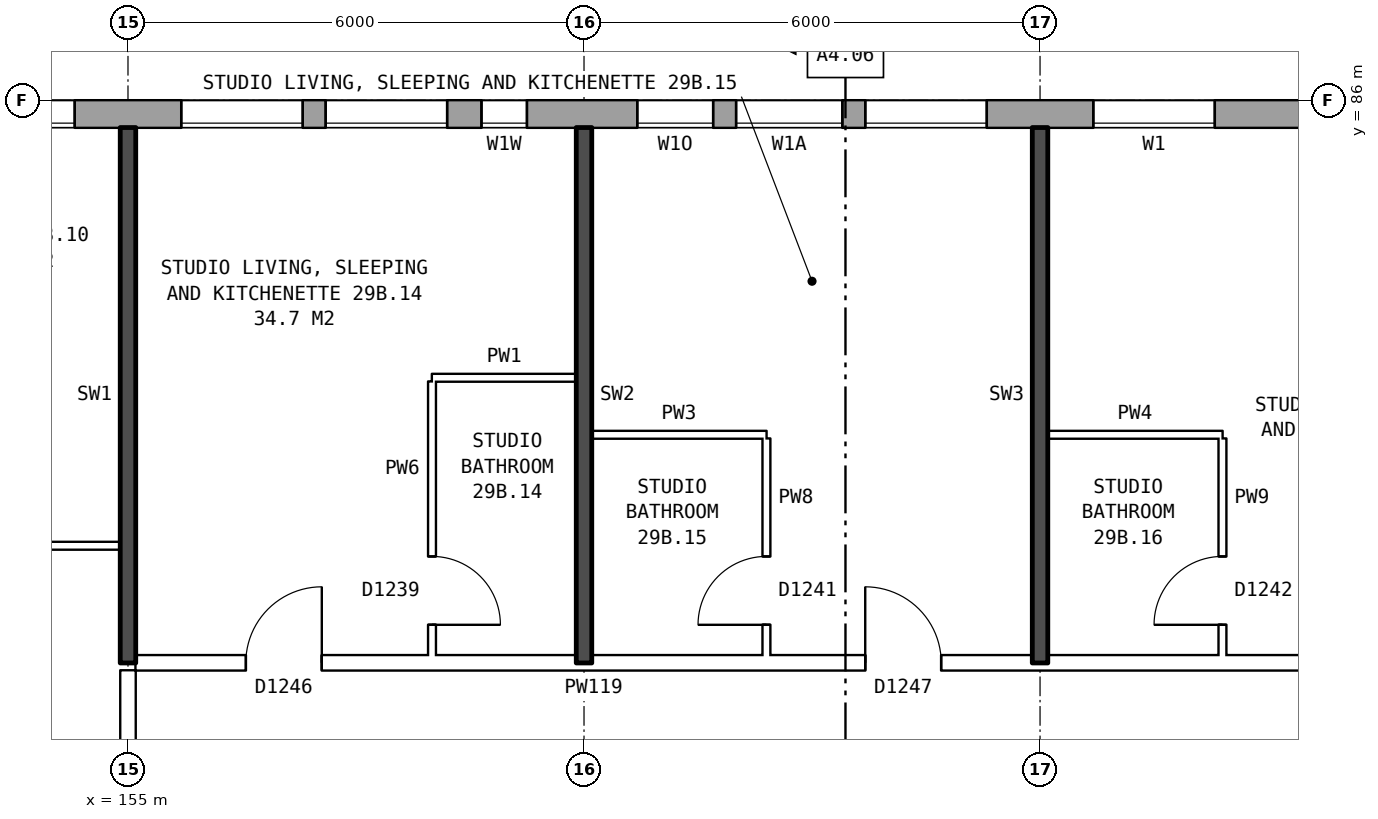
"""IFC4 building model, lengths in metres.
Left out: names, types, materials, properties, quantities, classifications, styles, units other than length and angle.
Written with IfcOpenShell. Run it as: python <this file> out.ifc"""

import sys

from ifc_helpers import new_model, si_unit, direction, frame, frame_2d, origin, place, context, subcontext, project, spatial, rectangle, extrude, element, fill, save


model = new_model("IFC4")
c1 = context("Model", 3, precision=1e-05, world=origin(), true_north=direction((0.0, 1.0)))
c2 = subcontext(c1, "Body", "Model", "MODEL_VIEW")
j1 = project(units=[si_unit("LENGTHUNIT", "METRE"), si_unit("PLANEANGLEUNIT", "RADIAN")], contexts=[c1])
p1 = place(None, origin())
s1 = spatial("IfcSite", under=j1, at=p1, CompositionType="ELEMENT")
p2 = place(p1, origin())
s2 = spatial("IfcBuilding", under=s1, at=p2, CompositionType="ELEMENT")
p3 = place(p2, frame((0.0, 0.0, 105.7)))
s3 = spatial("IfcBuildingStorey", under=s2, at=p3, CompositionType="ELEMENT", Elevation=105.7)
p4 = place(p3, frame((170.925, 85.82, 0.0), z_axis=(0.0, 0.0, 1.0), x_axis=(-1.0, 0.0, 0.0)))
e1 = element("IfcWall", 1, at=p4, inside=s3, PredefinedType="STANDARD", context=c2, shape_type="SweptSolid", body=[
    extrude(rectangle(XDim=36.851, YDim=0.36, at=frame_2d((18.425, 0.0))), origin(), (0.0, 0.0, 1.0), 2.85),
])
p5 = place(p4, frame((1.625, 0.0, 0.8)))
e2 = element("IfcOpeningElement", 2, at=p5, cuts=e1, PredefinedType="OPENING", context=c2, shape_type="SweptSolid", body=[
    extrude(rectangle(XDim=1.6, YDim=1.8, at=frame_2d((0.8, 0.9))), frame((0.0, 0.19, 0.0), z_axis=(0.0, -1.0, 0.0), x_axis=(1.0, 0.0, 0.0)), (0.0, 0.0, 1.0), 0.38),
])
p6 = place(p4, frame((4.625, 0.0, 0.8)))
e3 = element("IfcOpeningElement", 3, at=p6, cuts=e1, PredefinedType="OPENING", context=c2, shape_type="SweptSolid", body=[
    extrude(rectangle(XDim=1.6, YDim=1.8, at=frame_2d((0.8, 0.9))), frame((0.0, 0.19, 0.0), z_axis=(0.0, -1.0, 0.0), x_axis=(1.0, 0.0, 0.0)), (0.0, 0.0, 1.0), 0.38),
])
p7 = place(p4, frame((6.525, 0.0, 0.8)))
e4 = element("IfcOpeningElement", 4, at=p7, cuts=e1, PredefinedType="OPENING", context=c2, shape_type="SweptSolid", body=[
    extrude(rectangle(XDim=1.4, YDim=1.8, at=frame_2d((0.7, 0.9))), frame((0.0, 0.19, 0.0), z_axis=(0.0, -1.0, 0.0), x_axis=(1.0, 0.0, 0.0)), (0.0, 0.0, 1.0), 0.38),
])
p8 = place(p4, frame((10.675, 0.0, 0.8)))
e5 = element("IfcOpeningElement", 5, at=p8, cuts=e1, PredefinedType="OPENING", context=c2, shape_type="SweptSolid", body=[
    extrude(rectangle(XDim=0.6, YDim=0.9, at=frame_2d((0.3, 0.45))), frame((0.0, 0.19, 0.0), z_axis=(0.0, -1.0, 0.0), x_axis=(1.0, 0.0, 0.0)), (0.0, 0.0, 1.0), 0.38),
])
p9 = place(p4, frame((13.625, 0.0, 0.8)))
e6 = element("IfcOpeningElement", 6, at=p9, cuts=e1, PredefinedType="OPENING", context=c2, shape_type="SweptSolid", body=[
    extrude(rectangle(XDim=1.6, YDim=1.8, at=frame_2d((0.8, 0.9))), frame((0.0, 0.19, 0.0), z_axis=(0.0, -1.0, 0.0), x_axis=(1.0, 0.0, 0.0)), (0.0, 0.0, 1.0), 0.38),
])
p10 = place(p4, frame((16.625, 0.0, 0.8)))
e7 = element("IfcOpeningElement", 7, at=p10, cuts=e1, PredefinedType="OPENING", context=c2, shape_type="SweptSolid", body=[
    extrude(rectangle(XDim=1.6, YDim=1.8, at=frame_2d((0.8, 0.9))), frame((0.0, 0.19, 0.0), z_axis=(0.0, -1.0, 0.0), x_axis=(1.0, 0.0, 0.0)), (0.0, 0.0, 1.0), 0.38),
])
p11 = place(p4, frame((19.625, 0.0, 0.8)))
e8 = element("IfcOpeningElement", 8, at=p11, cuts=e1, PredefinedType="OPENING", context=c2, shape_type="SweptSolid", body=[
    extrude(rectangle(XDim=1.6, YDim=1.8, at=frame_2d((0.8, 0.9))), frame((0.0, 0.19, 0.0), z_axis=(0.0, -1.0, 0.0), x_axis=(1.0, 0.0, 0.0)), (0.0, 0.0, 1.0), 0.38),
])
p12 = place(p4, frame((22.625, 0.0, 0.8)))
e9 = element("IfcOpeningElement", 9, at=p12, cuts=e1, PredefinedType="OPENING", context=c2, shape_type="SweptSolid", body=[
    extrude(rectangle(XDim=1.6, YDim=1.8, at=frame_2d((0.8, 0.9))), frame((0.0, 0.19, 0.0), z_axis=(0.0, -1.0, 0.0), x_axis=(1.0, 0.0, 0.0)), (0.0, 0.0, 1.0), 0.38),
])
p13 = place(p4, frame((25.075, 0.0, 0.15)))
e10 = element("IfcOpeningElement", 10, at=p13, cuts=e1, PredefinedType="OPENING", context=c2, shape_type="SweptSolid", body=[
    extrude(rectangle(XDim=0.8, YDim=1.8, at=frame_2d((0.4, 0.9))), frame((0.0, 0.19, 0.0), z_axis=(0.0, -1.0, 0.0), x_axis=(1.0, 0.0, 0.0)), (0.0, 0.0, 1.0), 0.38),
])
p14 = place(p4, frame((28.625, 0.0, 0.8)))
e11 = element("IfcOpeningElement", 11, at=p14, cuts=e1, PredefinedType="OPENING", context=c2, shape_type="SweptSolid", body=[
    extrude(rectangle(XDim=1.6, YDim=1.8, at=frame_2d((0.8, 0.9))), frame((0.0, 0.19, 0.0), z_axis=(0.0, -1.0, 0.0), x_axis=(1.0, 0.0, 0.0)), (0.0, 0.0, 1.0), 0.38),
])
p15 = place(p4, frame((31.625, 0.0, 0.8)))
e12 = element("IfcOpeningElement", 12, at=p15, cuts=e1, PredefinedType="OPENING", context=c2, shape_type="SweptSolid", body=[
    extrude(rectangle(XDim=1.6, YDim=1.8, at=frame_2d((0.8, 0.9))), frame((0.0, 0.19, 0.0), z_axis=(0.0, -1.0, 0.0), x_axis=(1.0, 0.0, 0.0)), (0.0, 0.0, 1.0), 0.38),
])
p16 = place(p4, frame((34.625, 0.0, 0.8)))
e13 = element("IfcOpeningElement", 13, at=p16, cuts=e1, PredefinedType="OPENING", context=c2, shape_type="SweptSolid", body=[
    extrude(rectangle(XDim=1.6, YDim=1.8, at=frame_2d((0.8, 0.9))), frame((0.0, 0.19, 0.0), z_axis=(0.0, -1.0, 0.0), x_axis=(1.0, 0.0, 0.0)), (0.0, 0.0, 1.0), 0.38),
])
p17 = place(p4, frame((8.225, 0.0, 1.4)))
e14 = element("IfcOpeningElement", 14, at=p17, cuts=e1, PredefinedType="OPENING", context=c2, shape_type="SweptSolid", body=[
    extrude(rectangle(XDim=1.0, YDim=1.2, at=frame_2d((0.5, 0.6))), frame((0.0, 0.19, 0.0), z_axis=(0.0, -1.0, 0.0), x_axis=(1.0, 0.0, 0.0)), (0.0, 0.0, 1.0), 0.38),
])
p18 = place(p4, frame((11.725, 0.0, 0.8)))
e15 = element("IfcOpeningElement", 15, at=p18, cuts=e1, PredefinedType="OPENING", context=c2, shape_type="SweptSolid", body=[
    extrude(rectangle(XDim=1.6, YDim=1.8, at=frame_2d((0.8, 0.9))), frame((0.0, 0.19, 0.0), z_axis=(0.0, -1.0, 0.0), x_axis=(1.0, 0.0, 0.0)), (0.0, 0.0, 1.0), 0.38),
])
p19 = place(p4, frame((26.175, 0.0, 0.25)))
e16 = element("IfcOpeningElement", 16, at=p19, cuts=e1, PredefinedType="OPENING", context=c2, shape_type="SweptSolid", body=[
    extrude(rectangle(XDim=0.6, YDim=0.9, at=frame_2d((0.3, 0.45))), frame((0.0, 0.19, 0.0), z_axis=(0.0, -1.0, 0.0), x_axis=(1.0, 0.0, 0.0)), (0.0, 0.0, 1.0), 0.38),
])
p20 = place(p3, frame((155.1, 78.6, 0.0), z_axis=(0.0, 0.0, 1.0), x_axis=(1.0, 0.0, 0.0)))
e17 = element("IfcWall", 17, at=p20, inside=s3, PredefinedType="PARTITIONING", context=c2, shape_type="SweptSolid", body=[
    extrude(rectangle(XDim=18.54, YDim=0.2, at=frame_2d((9.27, 0.0))), origin(), (0.0, 0.0, 1.0), 2.85),
])
p21 = place(p20, frame((1.45, 0.0, 0.0)))
e18 = element("IfcOpeningElement", 18, at=p21, cuts=e17, PredefinedType="OPENING", context=c2, shape_type="SweptSolid", body=[
    extrude(rectangle(XDim=1.0, YDim=2.1, at=frame_2d((0.5, 1.05))), frame((0.0, 0.11, 0.0), z_axis=(0.0, -1.0, 0.0), x_axis=(1.0, 0.0, 0.0)), (0.0, 0.0, 1.0), 0.22),
])
p22 = place(p20, frame((9.6, 0.0, 0.0)))
e19 = element("IfcOpeningElement", 19, at=p22, cuts=e17, PredefinedType="OPENING", context=c2, shape_type="SweptSolid", body=[
    extrude(rectangle(XDim=1.0, YDim=2.1, at=frame_2d((0.5, 1.05))), frame((0.0, 0.11, 0.0), z_axis=(0.0, -1.0, 0.0), x_axis=(1.0, 0.0, 0.0)), (0.0, 0.0, 1.0), 0.22),
])
p23 = place(p20, frame((15.92, 0.0, 0.0)))
e20 = element("IfcOpeningElement", 20, at=p23, cuts=e17, PredefinedType="OPENING", context=c2, shape_type="SweptSolid", body=[
    extrude(rectangle(XDim=1.0, YDim=2.1, at=frame_2d((0.5, 1.05))), frame((0.0, 0.11, 0.0), z_axis=(0.0, -1.0, 0.0), x_axis=(1.0, 0.0, 0.0)), (0.0, 0.0, 1.0), 0.22),
])
p24 = place(p3, frame((152.0, 80.14, 0.0), z_axis=(0.0, 0.0, 1.0), x_axis=(1.0, 0.0, 0.0)))
e21 = element("IfcWall", 21, at=p24, inside=s3, PredefinedType="PARTITIONING", context=c2, shape_type="SweptSolid", body=[
    extrude(rectangle(XDim=2.9, YDim=0.1, at=frame_2d((1.45, 0.0))), origin(), (0.0, 0.0, 1.0), 2.85),
])
p25 = place(p24, frame((1.0, 0.0, 0.0)))
e22 = element("IfcOpeningElement", 22, at=p25, cuts=e21, PredefinedType="OPENING", context=c2, shape_type="SweptSolid", body=[
    extrude(rectangle(XDim=0.9, YDim=2.1, at=frame_2d((0.45, 1.05))), frame((0.0, 0.06, 0.0), z_axis=(0.0, -1.0, 0.0), x_axis=(1.0, 0.0, 0.0)), (0.0, 0.0, 1.0), 0.12),
])
for number, where, z_axis, x_axis in (
    (23, (161.1, 81.6, 0.0), (0.0, 0.0, 1.0), (1.0, 0.0, 0.0)),
    (24, (167.1, 81.6, 0.0), (0.0, 0.0, 1.0), (1.0, 0.0, 0.0)),
):
    element("IfcWall", number, at=place(p3, frame(where, z_axis=z_axis, x_axis=x_axis)), inside=s3, PredefinedType="PARTITIONING", context=c2, shape_type="SweptSolid", body=[
        extrude(rectangle(XDim=2.3, YDim=0.1, at=frame_2d((1.15, 0.0))), origin(), (0.0, 0.0, 1.0), 2.85),
    ])
p26 = place(p3, frame((159.0, 82.35, 0.0), z_axis=(0.0, 0.0, 1.0), x_axis=(1.0, 0.0, 0.0)))
e25 = element("IfcWall", 25, at=p26, inside=s3, PredefinedType="PARTITIONING", context=c2, shape_type="SweptSolid", body=[
    extrude(rectangle(XDim=1.9, YDim=0.1, at=frame_2d((0.95, 0.0))), origin(), (0.0, 0.0, 1.0), 2.85),
])
p27 = place(p3, frame((155.0, 76.3, 0.0), z_axis=(0.0, 0.0, 1.0), x_axis=(0.0, 1.0, 0.0)))
e26 = element("IfcWall", 26, at=p27, inside=s3, PredefinedType="PARTITIONING", context=c2, shape_type="SweptSolid", body=[
    extrude(rectangle(XDim=2.2, YDim=0.2, at=frame_2d((1.1, 0.0))), origin(), (0.0, 0.0, 1.0), 2.85),
])
p28 = place(p3, frame((155.0, 78.6, 0.0), z_axis=(0.0, 0.0, 1.0), x_axis=(0.0, 1.0, 0.0)))
e27 = element("IfcWall", 27, at=p28, inside=s3, PredefinedType="SOLIDWALL", context=c2, shape_type="SweptSolid", body=[
    extrude(rectangle(XDim=7.04, YDim=0.2, at=frame_2d((3.52, 0.0))), origin(), (0.0, 0.0, 1.0), 2.85),
])
p29 = place(p3, frame((159.0, 78.7, 0.0), z_axis=(0.0, 0.0, 1.0), x_axis=(0.0, 1.0, 0.0)))
e28 = element("IfcWall", 28, at=p29, inside=s3, PredefinedType="PARTITIONING", context=c2, shape_type="SweptSolid", body=[
    extrude(rectangle(XDim=3.6, YDim=0.1, at=frame_2d((1.8, 0.0))), origin(), (0.0, 0.0, 1.0), 2.85),
])
p30 = place(p29, frame((0.4, 0.0, 0.0)))
e29 = element("IfcOpeningElement", 29, at=p30, cuts=e28, PredefinedType="OPENING", context=c2, shape_type="SweptSolid", body=[
    extrude(rectangle(XDim=0.9, YDim=2.1, at=frame_2d((0.45, 1.05))), frame((0.0, 0.06, 0.0), z_axis=(0.0, -1.0, 0.0), x_axis=(1.0, 0.0, 0.0)), (0.0, 0.0, 1.0), 0.12),
])
p31 = place(p3, frame((161.0, 78.6, 0.0), z_axis=(0.0, 0.0, 1.0), x_axis=(0.0, 1.0, 0.0)))
e30 = element("IfcWall", 30, at=p31, inside=s3, PredefinedType="SOLIDWALL", context=c2, shape_type="SweptSolid", body=[
    extrude(rectangle(XDim=7.04, YDim=0.2, at=frame_2d((3.52, 0.0))), origin(), (0.0, 0.0, 1.0), 2.85),
])
p32 = place(p3, frame((163.4, 78.7, 0.0), z_axis=(0.0, 0.0, 1.0), x_axis=(0.0, 1.0, 0.0)))
e31 = element("IfcWall", 31, at=p32, inside=s3, PredefinedType="PARTITIONING", context=c2, shape_type="SweptSolid", body=[
    extrude(rectangle(XDim=2.85, YDim=0.1, at=frame_2d((1.425, 0.0))), origin(), (0.0, 0.0, 1.0), 2.85),
])
p33 = place(p32, frame((0.4, 0.0, 0.0)))
e32 = element("IfcOpeningElement", 32, at=p33, cuts=e31, PredefinedType="OPENING", context=c2, shape_type="SweptSolid", body=[
    extrude(rectangle(XDim=0.9, YDim=2.1, at=frame_2d((0.45, 1.05))), frame((0.0, 0.06, 0.0), z_axis=(0.0, -1.0, 0.0), x_axis=(1.0, 0.0, 0.0)), (0.0, 0.0, 1.0), 0.12),
])
p34 = place(p3, frame((167.0, 78.6, 0.0), z_axis=(0.0, 0.0, 1.0), x_axis=(0.0, 1.0, 0.0)))
e33 = element("IfcWall", 33, at=p34, inside=s3, PredefinedType="SOLIDWALL", context=c2, shape_type="SweptSolid", body=[
    extrude(rectangle(XDim=7.04, YDim=0.2, at=frame_2d((3.52, 0.0))), origin(), (0.0, 0.0, 1.0), 2.85),
])
p35 = place(p3, frame((169.4, 78.7, 0.0), z_axis=(0.0, 0.0, 1.0), x_axis=(0.0, 1.0, 0.0)))
e34 = element("IfcWall", 34, at=p35, inside=s3, PredefinedType="PARTITIONING", context=c2, shape_type="SweptSolid", body=[
    extrude(rectangle(XDim=2.85, YDim=0.1, at=frame_2d((1.425, 0.0))), origin(), (0.0, 0.0, 1.0), 2.85),
])
p36 = place(p35, frame((0.4, 0.0, 0.0)))
e35 = element("IfcOpeningElement", 35, at=p36, cuts=e34, PredefinedType="OPENING", context=c2, shape_type="SweptSolid", body=[
    extrude(rectangle(XDim=0.9, YDim=2.1, at=frame_2d((0.45, 1.05))), frame((0.0, 0.06, 0.0), z_axis=(0.0, -1.0, 0.0), x_axis=(1.0, 0.0, 0.0)), (0.0, 0.0, 1.0), 0.12),
])
p37 = place(p5, origin())
e36 = element("IfcWindow", 36, at=p37, inside=s3, PartitioningType="SINGLE_PANEL", PredefinedType="WINDOW", context=c2, shape_type="SweptSolid", body=[
    extrude(rectangle(XDim=1.6, YDim=1.8, at=frame_2d((0.8, 0.9))), frame((0.0, 0.15, 0.0), z_axis=(0.0, -1.0, 0.0), x_axis=(1.0, 0.0, 0.0)), (0.0, 0.0, 1.0), 0.06),
])
fill(e2, e36)
p38 = place(p6, origin())
e37 = element("IfcWindow", 37, at=p38, inside=s3, PartitioningType="SINGLE_PANEL", PredefinedType="WINDOW", context=c2, shape_type="SweptSolid", body=[
    extrude(rectangle(XDim=1.6, YDim=1.8, at=frame_2d((0.8, 0.9))), frame((0.0, 0.15, 0.0), z_axis=(0.0, -1.0, 0.0), x_axis=(1.0, 0.0, 0.0)), (0.0, 0.0, 1.0), 0.06),
])
fill(e3, e37)
p39 = place(p7, origin())
e38 = element("IfcWindow", 38, at=p39, inside=s3, PartitioningType="SINGLE_PANEL", PredefinedType="WINDOW", context=c2, shape_type="SweptSolid", body=[
    extrude(rectangle(XDim=1.4, YDim=1.8, at=frame_2d((0.7, 0.9))), frame((0.0, 0.15, 0.0), z_axis=(0.0, -1.0, 0.0), x_axis=(1.0, 0.0, 0.0)), (0.0, 0.0, 1.0), 0.06),
])
fill(e4, e38)
p40 = place(p8, origin())
e39 = element("IfcWindow", 39, at=p40, inside=s3, PartitioningType="SINGLE_PANEL", PredefinedType="WINDOW", context=c2, shape_type="SweptSolid", body=[
    extrude(rectangle(XDim=0.6, YDim=0.9, at=frame_2d((0.3, 0.45))), frame((0.0, 0.15, 0.0), z_axis=(0.0, -1.0, 0.0), x_axis=(1.0, 0.0, 0.0)), (0.0, 0.0, 1.0), 0.06),
])
fill(e5, e39)
p41 = place(p9, origin())
e40 = element("IfcWindow", 40, at=p41, inside=s3, PartitioningType="SINGLE_PANEL", PredefinedType="WINDOW", context=c2, shape_type="SweptSolid", body=[
    extrude(rectangle(XDim=1.6, YDim=1.8, at=frame_2d((0.8, 0.9))), frame((0.0, 0.15, 0.0), z_axis=(0.0, -1.0, 0.0), x_axis=(1.0, 0.0, 0.0)), (0.0, 0.0, 1.0), 0.06),
])
fill(e6, e40)
p42 = place(p10, origin())
e41 = element("IfcWindow", 41, at=p42, inside=s3, PartitioningType="SINGLE_PANEL", PredefinedType="WINDOW", context=c2, shape_type="SweptSolid", body=[
    extrude(rectangle(XDim=1.6, YDim=1.8, at=frame_2d((0.8, 0.9))), frame((0.0, 0.15, 0.0), z_axis=(0.0, -1.0, 0.0), x_axis=(1.0, 0.0, 0.0)), (0.0, 0.0, 1.0), 0.06),
])
fill(e7, e41)
p43 = place(p21, origin())
e42 = element("IfcDoor", 42, at=p43, inside=s3, OperationType="SINGLE_SWING_RIGHT", PredefinedType="DOOR", context=c2, shape_type="SweptSolid", body=[
    extrude(rectangle(XDim=1.0, YDim=2.1, at=frame_2d((0.5, 1.05))), frame((0.0, 0.025, 0.0), z_axis=(0.0, -1.0, 0.0), x_axis=(1.0, 0.0, 0.0)), (0.0, 0.0, 1.0), 0.05),
])
fill(e18, e42)
p44 = place(p30, frame((0.9, 0.0, 0.0), z_axis=(0.0, 0.0, 1.0), x_axis=(-1.0, 0.0, 0.0)))
e43 = element("IfcDoor", 43, at=p44, inside=s3, OperationType="SINGLE_SWING_RIGHT", PredefinedType="DOOR", context=c2, shape_type="SweptSolid", body=[
    extrude(rectangle(XDim=0.9, YDim=2.1, at=frame_2d((0.45, 1.05))), frame((0.0, 0.025, 0.0), z_axis=(0.0, -1.0, 0.0), x_axis=(1.0, 0.0, 0.0)), (0.0, 0.0, 1.0), 0.05),
])
fill(e29, e43)
p45 = place(p22, origin())
e44 = element("IfcDoor", 44, at=p45, inside=s3, OperationType="SINGLE_SWING_LEFT", PredefinedType="DOOR", context=c2, shape_type="SweptSolid", body=[
    extrude(rectangle(XDim=1.0, YDim=2.1, at=frame_2d((0.5, 1.05))), frame((0.0, 0.025, 0.0), z_axis=(0.0, -1.0, 0.0), x_axis=(1.0, 0.0, 0.0)), (0.0, 0.0, 1.0), 0.05),
])
fill(e19, e44)
p46 = place(p33, origin())
e45 = element("IfcDoor", 45, at=p46, inside=s3, OperationType="SINGLE_SWING_LEFT", PredefinedType="DOOR", context=c2, shape_type="SweptSolid", body=[
    extrude(rectangle(XDim=0.9, YDim=2.1, at=frame_2d((0.45, 1.05))), frame((0.0, 0.025, 0.0), z_axis=(0.0, -1.0, 0.0), x_axis=(1.0, 0.0, 0.0)), (0.0, 0.0, 1.0), 0.05),
])
fill(e32, e45)
p47 = place(p36, origin())
e46 = element("IfcDoor", 46, at=p47, inside=s3, OperationType="SINGLE_SWING_LEFT", PredefinedType="DOOR", context=c2, shape_type="SweptSolid", body=[
    extrude(rectangle(XDim=0.9, YDim=2.1, at=frame_2d((0.45, 1.05))), frame((0.0, 0.025, 0.0), z_axis=(0.0, -1.0, 0.0), x_axis=(1.0, 0.0, 0.0)), (0.0, 0.0, 1.0), 0.05),
])
fill(e35, e46)
p48 = place(p17, origin())
e47 = element("IfcWindow", 47, at=p48, inside=s3, PartitioningType="SINGLE_PANEL", PredefinedType="WINDOW", context=c2, shape_type="SweptSolid", body=[
    extrude(rectangle(XDim=1.0, YDim=1.2, at=frame_2d((0.5, 0.6))), frame((0.0, 0.15, 0.0), z_axis=(0.0, -1.0, 0.0), x_axis=(1.0, 0.0, 0.0)), (0.0, 0.0, 1.0), 0.06),
])
fill(e14, e47)
p49 = place(p18, origin())
e48 = element("IfcWindow", 48, at=p49, inside=s3, PartitioningType="SINGLE_PANEL", PredefinedType="WINDOW", context=c2, shape_type="SweptSolid", body=[
    extrude(rectangle(XDim=1.6, YDim=1.8, at=frame_2d((0.8, 0.9))), frame((0.0, 0.15, 0.0), z_axis=(0.0, -1.0, 0.0), x_axis=(1.0, 0.0, 0.0)), (0.0, 0.0, 1.0), 0.06),
])
fill(e15, e48)
save(model, sys.argv[1])
